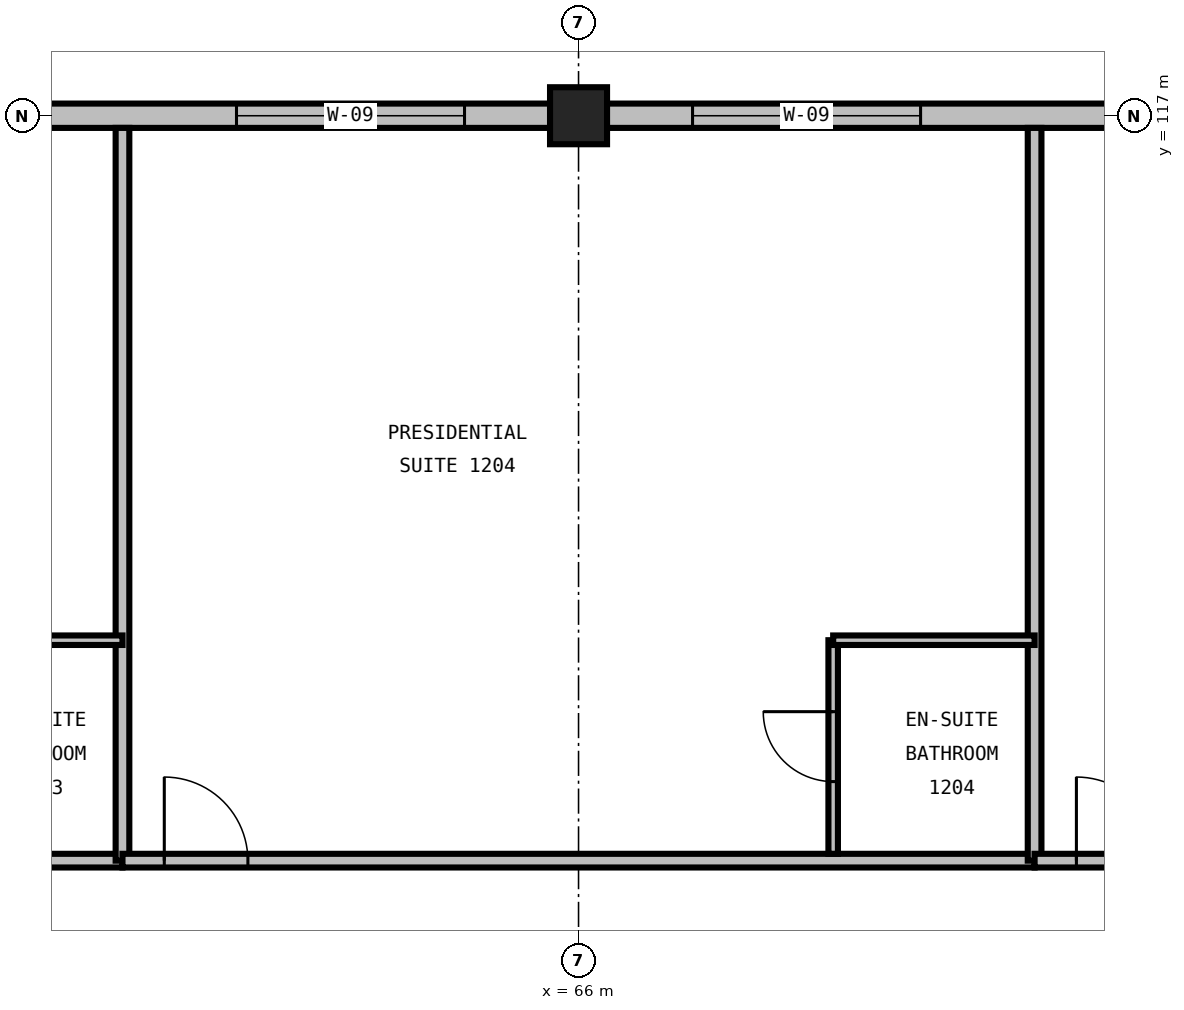
"""IFC4 building model, lengths in metres.
Left out: names, types, materials, properties, quantities, classifications, styles, units other than length and angle.
Written with IfcOpenShell. Run it as: python <this file> out.ifc"""

import sys

from ifc_helpers import new_model, si_unit, direction, frame, frame_2d, origin, origin_2d, place, context, subcontext, project, spatial, rectangle, extrude, element, fill, save


model = new_model("IFC4")
c1 = context("Model", 3, precision=1e-05, world=origin(), true_north=direction((0.0, 1.0)))
c2 = subcontext(c1, "Body", "Model", "MODEL_VIEW")
j1 = project(units=[si_unit("LENGTHUNIT", "METRE"), si_unit("PLANEANGLEUNIT", "RADIAN")], contexts=[c1])
p1 = place(None, origin())
s1 = spatial("IfcSite", under=j1, at=p1, CompositionType="ELEMENT")
p2 = place(p1, origin())
s2 = spatial("IfcBuilding", under=s1, at=p2, CompositionType="ELEMENT")
p3 = place(p2, frame((0.0, 0.0, 52.8)))
s3 = spatial("IfcBuildingStorey", under=s2, at=p3, CompositionType="ELEMENT", Elevation=52.8)
p4 = place(p3, frame((66.0, 117.0, 0.0), z_axis=(0.0, 0.0, 1.0), x_axis=(1.0, 0.0, 0.0)))
e1 = element("IfcColumn", 1, at=p4, inside=s3, PredefinedType="COLUMN", context=c2, shape_type="SweptSolid", body=[
    extrude(rectangle(XDim=0.75, YDim=0.75, at=origin_2d()), origin(), (0.0, 0.0, 1.0), 3.6),
])
p5 = place(p3, frame((66.0, 117.0, 0.0), z_axis=(0.0, 0.0, 1.0), x_axis=(-1.0, 0.0, 0.0)))
e2 = element("IfcWall", 2, at=p5, inside=s3, PredefinedType="STANDARD", context=c2, shape_type="SweptSolid", body=[
    extrude(rectangle(XDim=12.0, YDim=0.32, at=frame_2d((6.0, 0.0))), origin(), (0.0, 0.0, 1.0), 2.536),
])
p6 = place(p5, frame((1.5, 0.0, 0.7)))
e3 = element("IfcOpeningElement", 3, at=p6, cuts=e2, PredefinedType="OPENING", context=c2, shape_type="SweptSolid", body=[
    extrude(rectangle(XDim=3.0, YDim=1.71, at=frame_2d((1.5, 0.855))), frame((0.0, 0.175, 0.0), z_axis=(0.0, -1.0, 0.0), x_axis=(1.0, 0.0, 0.0)), (0.0, 0.0, 1.0), 0.35),
])
p7 = place(p5, frame((7.5, 0.0, 0.7)))
e4 = element("IfcOpeningElement", 4, at=p7, cuts=e2, PredefinedType="OPENING", context=c2, shape_type="SweptSolid", body=[
    extrude(rectangle(XDim=3.0, YDim=1.71, at=frame_2d((1.5, 0.855))), frame((0.0, 0.175, 0.0), z_axis=(0.0, -1.0, 0.0), x_axis=(1.0, 0.0, 0.0)), (0.0, 0.0, 1.0), 0.35),
])
p8 = place(p3, frame((78.0, 117.0, 0.0), z_axis=(0.0, 0.0, 1.0), x_axis=(-1.0, 0.0, 0.0)))
e5 = element("IfcWall", 5, at=p8, inside=s3, PredefinedType="STANDARD", context=c2, shape_type="SweptSolid", body=[
    extrude(rectangle(XDim=12.0, YDim=0.32, at=frame_2d((6.0, 0.0))), origin(), (0.0, 0.0, 1.0), 2.536),
])
p9 = place(p8, frame((1.5, 0.0, 0.7)))
e6 = element("IfcOpeningElement", 6, at=p9, cuts=e5, PredefinedType="OPENING", context=c2, shape_type="SweptSolid", body=[
    extrude(rectangle(XDim=3.0, YDim=1.71, at=frame_2d((1.5, 0.855))), frame((0.0, 0.175, 0.0), z_axis=(0.0, -1.0, 0.0), x_axis=(1.0, 0.0, 0.0)), (0.0, 0.0, 1.0), 0.35),
])
p10 = place(p8, frame((7.5, 0.0, 0.7)))
e7 = element("IfcOpeningElement", 7, at=p10, cuts=e5, PredefinedType="OPENING", context=c2, shape_type="SweptSolid", body=[
    extrude(rectangle(XDim=3.0, YDim=1.71, at=frame_2d((1.5, 0.855))), frame((0.0, 0.175, 0.0), z_axis=(0.0, -1.0, 0.0), x_axis=(1.0, 0.0, 0.0)), (0.0, 0.0, 1.0), 0.35),
])
p11 = place(p3, frame((48.0, 107.2, 0.0), z_axis=(0.0, 0.0, 1.0), x_axis=(1.0, 0.0, 0.0)))
e8 = element("IfcWall", 8, at=p11, inside=s3, PredefinedType="PARTITIONING", context=c2, shape_type="SweptSolid", body=[
    extrude(rectangle(XDim=12.0, YDim=0.18, at=frame_2d((6.0, 0.0))), origin(), (0.0, 0.0, 1.0), 3.29),
])
p12 = place(p11, frame((0.55, 0.0, 0.0)))
e9 = element("IfcOpeningElement", 9, at=p12, cuts=e8, PredefinedType="OPENING", context=c2, shape_type="SweptSolid", body=[
    extrude(rectangle(XDim=1.1, YDim=2.2, at=frame_2d((0.55, 1.1))), frame((0.0, 0.105, 0.0), z_axis=(0.0, -1.0, 0.0), x_axis=(1.0, 0.0, 0.0)), (0.0, 0.0, 1.0), 0.21),
])
p13 = place(p3, frame((60.0, 107.2, 0.0), z_axis=(0.0, 0.0, 1.0), x_axis=(0.0, 1.0, 0.0)))
e10 = element("IfcWall", 10, at=p13, inside=s3, PredefinedType="PARTITIONING", context=c2, shape_type="SweptSolid", body=[
    extrude(rectangle(XDim=9.64, YDim=0.18, at=frame_2d((4.82, 0.0))), origin(), (0.0, 0.0, 1.0), 3.29),
])
p14 = place(p3, frame((57.35, 110.1, 0.0), z_axis=(0.0, 0.0, 1.0), x_axis=(1.0, 0.0, 0.0)))
e11 = element("IfcWall", 11, at=p14, inside=s3, PredefinedType="PARTITIONING", context=c2, shape_type="SweptSolid", body=[
    extrude(rectangle(XDim=2.65, YDim=0.125, at=frame_2d((1.325, 0.0))), origin(), (0.0, 0.0, 1.0), 3.29),
])
p15 = place(p3, frame((60.0, 107.2, 0.0), z_axis=(0.0, 0.0, 1.0), x_axis=(1.0, 0.0, 0.0)))
e12 = element("IfcWall", 12, at=p15, inside=s3, PredefinedType="PARTITIONING", context=c2, shape_type="SweptSolid", body=[
    extrude(rectangle(XDim=12.0, YDim=0.18, at=frame_2d((6.0, 0.0))), origin(), (0.0, 0.0, 1.0), 3.29),
])
p16 = place(p15, frame((0.55, 0.0, 0.0)))
e13 = element("IfcOpeningElement", 13, at=p16, cuts=e12, PredefinedType="OPENING", context=c2, shape_type="SweptSolid", body=[
    extrude(rectangle(XDim=1.1, YDim=2.2, at=frame_2d((0.55, 1.1))), frame((0.0, 0.105, 0.0), z_axis=(0.0, -1.0, 0.0), x_axis=(1.0, 0.0, 0.0)), (0.0, 0.0, 1.0), 0.21),
])
p17 = place(p3, frame((72.0, 107.2, 0.0), z_axis=(0.0, 0.0, 1.0), x_axis=(0.0, 1.0, 0.0)))
e14 = element("IfcWall", 14, at=p17, inside=s3, PredefinedType="PARTITIONING", context=c2, shape_type="SweptSolid", body=[
    extrude(rectangle(XDim=9.64, YDim=0.18, at=frame_2d((4.82, 0.0))), origin(), (0.0, 0.0, 1.0), 3.29),
])
p18 = place(p3, frame((69.35, 107.29, 0.0), z_axis=(0.0, 0.0, 1.0), x_axis=(0.0, 1.0, 0.0)))
e15 = element("IfcWall", 15, at=p18, inside=s3, PredefinedType="PARTITIONING", context=c2, shape_type="SweptSolid", body=[
    extrude(rectangle(XDim=2.81, YDim=0.125, at=frame_2d((1.405, 0.0))), origin(), (0.0, 0.0, 1.0), 3.29),
])
p19 = place(p18, frame((0.95, 0.0, 0.0)))
e16 = element("IfcOpeningElement", 16, at=p19, cuts=e15, PredefinedType="OPENING", context=c2, shape_type="SweptSolid", body=[
    extrude(rectangle(XDim=0.92, YDim=2.1, at=frame_2d((0.46, 1.05))), frame((0.0, 0.077, 0.0), z_axis=(0.0, -1.0, 0.0), x_axis=(1.0, 0.0, 0.0)), (0.0, 0.0, 1.0), 0.155),
])
p20 = place(p3, frame((69.35, 110.1, 0.0), z_axis=(0.0, 0.0, 1.0), x_axis=(1.0, 0.0, 0.0)))
e17 = element("IfcWall", 17, at=p20, inside=s3, PredefinedType="PARTITIONING", context=c2, shape_type="SweptSolid", body=[
    extrude(rectangle(XDim=2.65, YDim=0.125, at=frame_2d((1.325, 0.0))), origin(), (0.0, 0.0, 1.0), 3.29),
])
p21 = place(p3, frame((72.0, 107.2, 0.0), z_axis=(0.0, 0.0, 1.0), x_axis=(1.0, 0.0, 0.0)))
e18 = element("IfcWall", 18, at=p21, inside=s3, PredefinedType="PARTITIONING", context=c2, shape_type="SweptSolid", body=[
    extrude(rectangle(XDim=11.915, YDim=0.18, at=frame_2d((5.957, 0.0))), origin(), (0.0, 0.0, 1.0), 3.29),
])
p22 = place(p21, frame((0.55, 0.0, 0.0)))
e19 = element("IfcOpeningElement", 19, at=p22, cuts=e18, PredefinedType="OPENING", context=c2, shape_type="SweptSolid", body=[
    extrude(rectangle(XDim=1.1, YDim=2.2, at=frame_2d((0.55, 1.1))), frame((0.0, 0.105, 0.0), z_axis=(0.0, -1.0, 0.0), x_axis=(1.0, 0.0, 0.0)), (0.0, 0.0, 1.0), 0.21),
])
p23 = place(p6, origin())
e20 = element("IfcWindow", 20, at=p23, inside=s3, PartitioningType="TRIPLE_PANEL_VERTICAL", PredefinedType="WINDOW", context=c2, shape_type="SweptSolid", body=[
    extrude(rectangle(XDim=3.0, YDim=1.71, at=frame_2d((1.5, 0.855))), frame((0.0, 0.03, 0.0), z_axis=(0.0, -1.0, 0.0), x_axis=(1.0, 0.0, 0.0)), (0.0, 0.0, 1.0), 0.06),
])
fill(e3, e20)
p24 = place(p10, origin())
e21 = element("IfcWindow", 21, at=p24, inside=s3, PartitioningType="TRIPLE_PANEL_VERTICAL", PredefinedType="WINDOW", context=c2, shape_type="SweptSolid", body=[
    extrude(rectangle(XDim=3.0, YDim=1.71, at=frame_2d((1.5, 0.855))), frame((0.0, 0.03, 0.0), z_axis=(0.0, -1.0, 0.0), x_axis=(1.0, 0.0, 0.0)), (0.0, 0.0, 1.0), 0.06),
])
fill(e7, e21)
p25 = place(p16, origin())
e22 = element("IfcDoor", 22, at=p25, inside=s3, OperationType="SINGLE_SWING_LEFT", PredefinedType="DOOR", context=c2, shape_type="SweptSolid", body=[
    extrude(rectangle(XDim=1.1, YDim=2.2, at=frame_2d((0.55, 1.1))), frame((0.0, 0.025, 0.0), z_axis=(0.0, -1.0, 0.0), x_axis=(1.0, 0.0, 0.0)), (0.0, 0.0, 1.0), 0.05),
])
fill(e13, e22)
p26 = place(p19, origin())
e23 = element("IfcDoor", 23, at=p26, inside=s3, OperationType="SINGLE_SWING_RIGHT", PredefinedType="DOOR", context=c2, shape_type="SweptSolid", body=[
    extrude(rectangle(XDim=0.92, YDim=2.1, at=frame_2d((0.46, 1.05))), frame((0.0, 0.025, 0.0), z_axis=(0.0, -1.0, 0.0), x_axis=(1.0, 0.0, 0.0)), (0.0, 0.0, 1.0), 0.05),
])
fill(e16, e23)
p27 = place(p22, origin())
e24 = element("IfcDoor", 24, at=p27, inside=s3, OperationType="SINGLE_SWING_LEFT", PredefinedType="DOOR", context=c2, shape_type="SweptSolid", body=[
    extrude(rectangle(XDim=1.1, YDim=2.2, at=frame_2d((0.55, 1.1))), frame((0.0, 0.025, 0.0), z_axis=(0.0, -1.0, 0.0), x_axis=(1.0, 0.0, 0.0)), (0.0, 0.0, 1.0), 0.05),
])
fill(e19, e24)
save(model, sys.argv[1])
